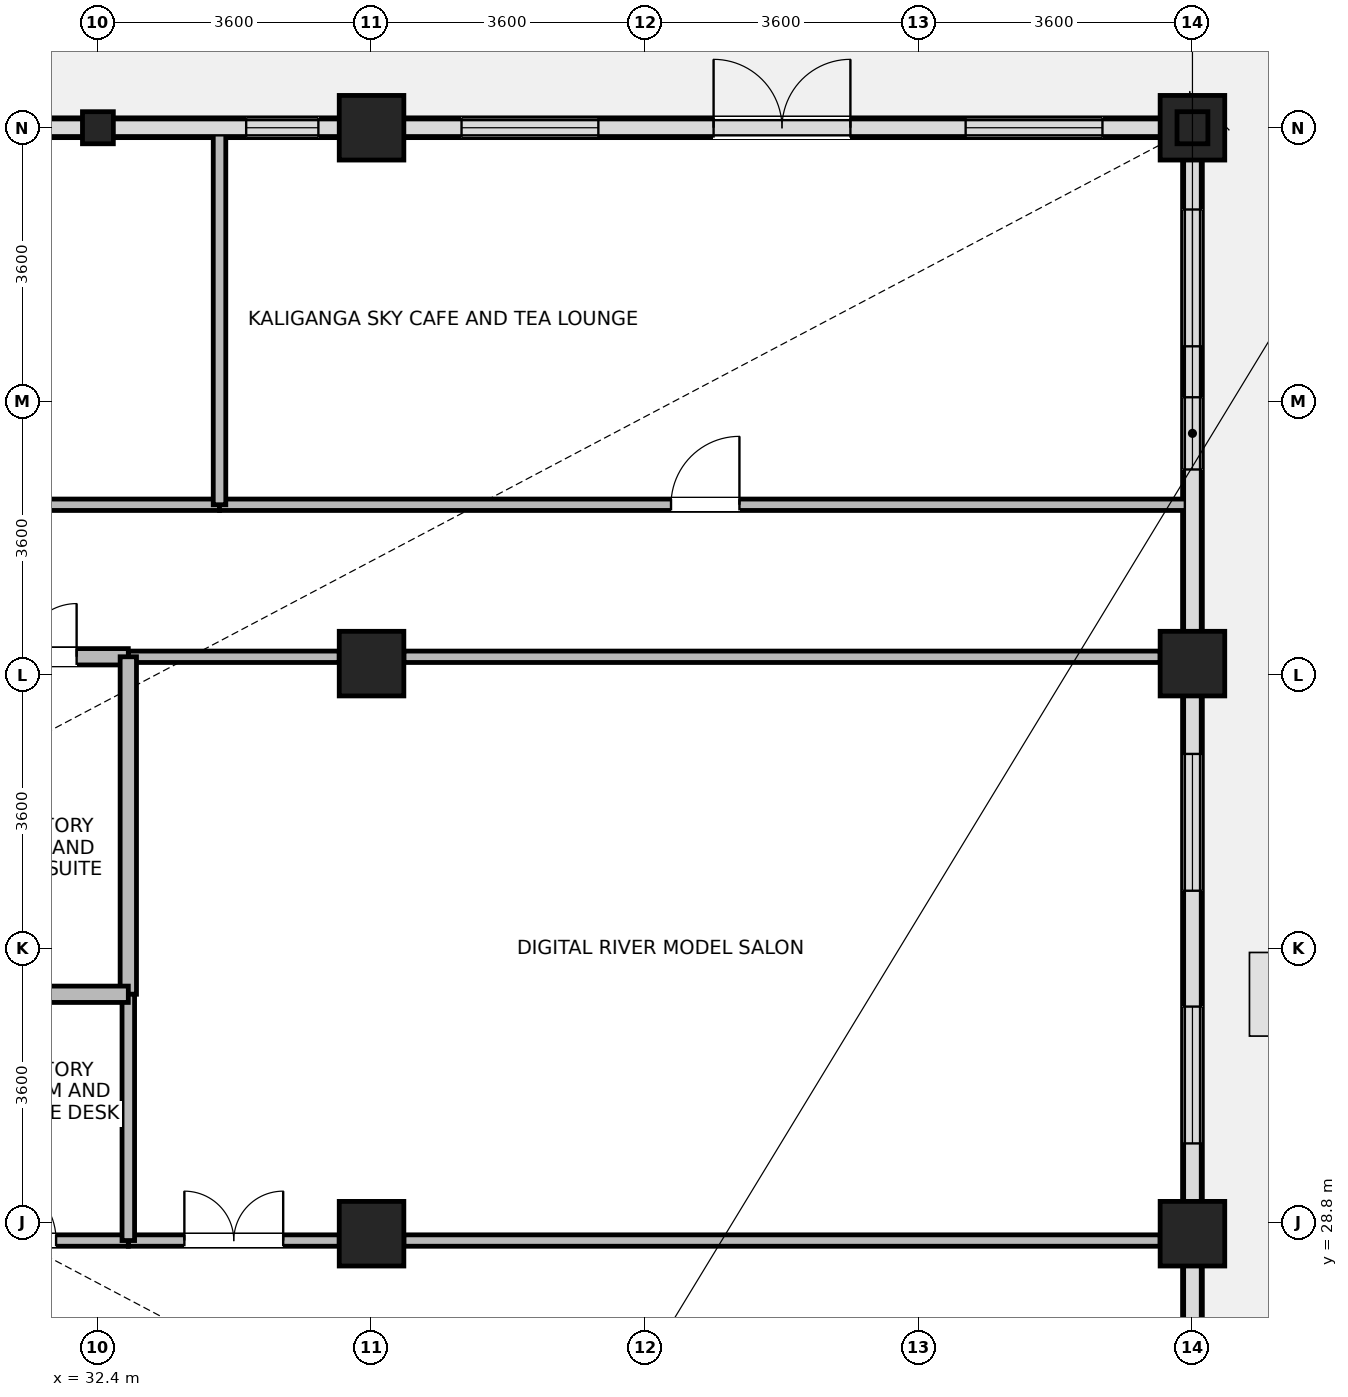
"""IFC4 building model, lengths in metres.
Left out: names, types, materials, properties, quantities, classifications, styles, units other than length and angle.
Written with IfcOpenShell. Run it as: python <this file> out.ifc"""

import sys

from ifc_helpers import new_model, si_unit, direction, frame, frame_2d, origin, origin_2d, place, context, subcontext, project, spatial, rectangle, i_section, extrude, source, transform, mapped, element, fill, save


model = new_model("IFC4")
c1 = context("Model", 3, precision=1e-05, world=origin(), true_north=direction((0.0, 1.0)))
c2 = subcontext(c1, "Body", "Model", "MODEL_VIEW")
j1 = project(units=[si_unit("LENGTHUNIT", "METRE"), si_unit("PLANEANGLEUNIT", "RADIAN")], contexts=[c1])
p1 = place(None, origin())
s1 = spatial("IfcSite", under=j1, at=p1, CompositionType="ELEMENT")
p2 = place(p1, origin())
s2 = spatial("IfcBuilding", under=s1, at=p2, CompositionType="ELEMENT")
p3 = place(p2, frame((0.0, 0.0, 298.0)))
s3 = spatial("IfcBuildingStorey", under=s2, at=p3, CompositionType="ELEMENT", Elevation=298.0)
m1 = source(origin(), c2, "Body", "SweptSolid", [
    extrude(rectangle(XDim=0.85, YDim=0.85, at=origin_2d()), origin(), (0.0, 0.0, 1.0), 6.0),
])
for number, where, z_axis, x_axis in (
    (1, (36.0, 43.2, 0.0), (0.0, 0.0, 1.0), (1.0, 0.0, 0.0)),
    (2, (36.0, 28.65, 0.0), (0.0, 0.0, 1.0), (1.0, 0.0, 0.0)),
    (3, (36.0, 36.15, 0.0), (0.0, 0.0, 1.0), (1.0, 0.0, 0.0)),
    (4, (46.8, 28.65, 0.0), (0.0, 0.0, 1.0), (1.0, 0.0, 0.0)),
    (5, (46.8, 36.15, 0.0), (0.0, 0.0, 1.0), (1.0, 0.0, 0.0)),
    (6, (46.8, 43.2, 0.0), (0.0, 0.0, 1.0), (1.0, 0.0, 0.0)),
):
    element("IfcColumn", number, at=place(p3, frame(where, z_axis=z_axis, x_axis=x_axis)), inside=s3, PredefinedType="COLUMN", context=c2, shape_type="MappedRepresentation", body=[
        mapped(m1, transform((0.0, 0.0, 0.0), x_axis=(1.0, 0.0, 0.0), y_axis=(0.0, 1.0, 0.0), z_axis=(0.0, 0.0, 1.0), scale=1.0)),
    ])
m2 = source(origin(), c2, "Body", "SweptSolid", [
    extrude(i_section(OverallWidth=0.406, OverallDepth=0.422, WebThickness=0.023, FlangeThickness=0.031, FilletRadius=0.015, at=origin_2d()), origin(), (0.0, 0.0, 1.0), 6.0),
])
p4 = place(p3, frame((32.4, 43.2, 0.0), z_axis=(0.0, 0.0, 1.0), x_axis=(1.0, 0.0, 0.0)))
e7 = element("IfcColumn", 7, at=p4, inside=s3, PredefinedType="COLUMN", context=c2, shape_type="MappedRepresentation", body=[
    mapped(m2, transform((0.0, 0.0, 0.0), x_axis=(1.0, 0.0, 0.0), y_axis=(0.0, 1.0, 0.0), z_axis=(0.0, 0.0, 1.0), scale=1.0)),
])
m3 = source(origin(), c2, "Body", "SweptSolid", [
    extrude(i_section(OverallWidth=0.406, OverallDepth=0.422, WebThickness=0.023, FlangeThickness=0.031, FilletRadius=0.015, at=origin_2d()), origin(), (0.0, 0.0, 1.0), 15.0),
])
p5 = place(p3, frame((46.8, 43.2, 6.0), z_axis=(0.0, 0.0, 1.0), x_axis=(1.0, 0.0, 0.0)))
e8 = element("IfcColumn", 8, at=p5, inside=s3, PredefinedType="COLUMN", context=c2, shape_type="MappedRepresentation", body=[
    mapped(m3, transform((0.0, 0.0, 0.0), x_axis=(1.0, 0.0, 0.0), y_axis=(0.0, 1.0, 0.0), z_axis=(0.0, 0.0, 1.0), scale=1.0)),
])
p6 = place(p3, frame((46.8, 28.224, 0.0), z_axis=(0.0, 0.0, 1.0), x_axis=(0.0, -1.0, 0.0)))
e9 = element("IfcWall", 9, at=p6, inside=s3, PredefinedType="STANDARD", context=c2, shape_type="SweptSolid", body=[
    extrude(rectangle(XDim=6.198, YDim=0.26, at=frame_2d((3.099, 0.0))), origin(), (0.0, 0.0, 1.0), 5.58),
])
p7 = place(p6, frame((2.199, 0.0, 0.0)))
e10 = element("IfcOpeningElement", 10, at=p7, cuts=e9, PredefinedType="OPENING", context=c2, shape_type="SweptSolid", body=[
    extrude(rectangle(XDim=1.8, YDim=2.2, at=frame_2d((0.9, 1.1))), frame((0.0, 0.14, 0.0), z_axis=(0.0, -1.0, 0.0), x_axis=(1.0, 0.0, 0.0)), (0.0, 0.0, 1.0), 0.28),
])
p8 = place(p3, frame((46.8, 35.724, 0.0), z_axis=(0.0, 0.0, 1.0), x_axis=(0.0, -1.0, 0.0)))
e11 = element("IfcWall", 11, at=p8, inside=s3, PredefinedType="STANDARD", context=c2, shape_type="SweptSolid", body=[
    extrude(rectangle(XDim=6.648, YDim=0.26, at=frame_2d((3.324, 0.0))), origin(), (0.0, 0.0, 1.0), 5.58),
])
p9 = place(p8, frame((0.762, 0.0, 0.85)))
e12 = element("IfcOpeningElement", 12, at=p9, cuts=e11, PredefinedType="OPENING", context=c2, shape_type="SweptSolid", body=[
    extrude(rectangle(XDim=1.8, YDim=1.85, at=frame_2d((0.9, 0.925))), frame((0.0, 0.14, 0.0), z_axis=(0.0, -1.0, 0.0), x_axis=(1.0, 0.0, 0.0)), (0.0, 0.0, 1.0), 0.28),
])
p10 = place(p8, frame((4.086, 0.0, 0.85)))
e13 = element("IfcOpeningElement", 13, at=p10, cuts=e11, PredefinedType="OPENING", context=c2, shape_type="SweptSolid", body=[
    extrude(rectangle(XDim=1.8, YDim=1.85, at=frame_2d((0.9, 0.925))), frame((0.0, 0.14, 0.0), z_axis=(0.0, -1.0, 0.0), x_axis=(1.0, 0.0, 0.0)), (0.0, 0.0, 1.0), 0.28),
])
p11 = place(p3, frame((46.8, 42.774, 0.0), z_axis=(0.0, 0.0, 1.0), x_axis=(0.0, -1.0, 0.0)))
e14 = element("IfcWall", 14, at=p11, inside=s3, PredefinedType="STANDARD", context=c2, shape_type="SweptSolid", body=[
    extrude(rectangle(XDim=6.198, YDim=0.26, at=frame_2d((3.099, 0.0))), origin(), (0.0, 0.0, 1.0), 5.58),
])
p12 = place(p11, frame((0.649, 0.0, 0.85)))
e15 = element("IfcOpeningElement", 15, at=p12, cuts=e14, PredefinedType="OPENING", context=c2, shape_type="SweptSolid", body=[
    extrude(rectangle(XDim=1.8, YDim=1.85, at=frame_2d((0.9, 0.925))), frame((0.0, 0.14, 0.0), z_axis=(0.0, -1.0, 0.0), x_axis=(1.0, 0.0, 0.0)), (0.0, 0.0, 1.0), 0.28),
])
p13 = place(p11, frame((3.12, 0.0, 0.85)))
e16 = element("IfcOpeningElement", 16, at=p13, cuts=e14, PredefinedType="OPENING", context=c2, shape_type="SweptSolid", body=[
    extrude(rectangle(XDim=0.95, YDim=1.75, at=frame_2d((0.475, 0.875))), frame((0.0, 0.14, 0.0), z_axis=(0.0, -1.0, 0.0), x_axis=(1.0, 0.0, 0.0)), (0.0, 0.0, 1.0), 0.28),
])
p14 = place(p3, frame((36.426, 43.2, 0.0), z_axis=(0.0, 0.0, 1.0), x_axis=(1.0, 0.0, 0.0)))
e17 = element("IfcWall", 17, at=p14, inside=s3, PredefinedType="STANDARD", context=c2, shape_type="SweptSolid", body=[
    extrude(rectangle(XDim=9.948, YDim=0.26, at=frame_2d((4.974, 0.0))), origin(), (0.0, 0.0, 1.0), 5.58),
])
p15 = place(p14, frame((4.074, 0.0, 0.0)))
e18 = element("IfcOpeningElement", 18, at=p15, cuts=e17, PredefinedType="OPENING", context=c2, shape_type="SweptSolid", body=[
    extrude(rectangle(XDim=1.8, YDim=2.2, at=frame_2d((0.9, 1.1))), frame((0.0, 0.14, 0.0), z_axis=(0.0, -1.0, 0.0), x_axis=(1.0, 0.0, 0.0)), (0.0, 0.0, 1.0), 0.28),
])
p16 = place(p14, frame((0.758, 0.0, 0.85)))
e19 = element("IfcOpeningElement", 19, at=p16, cuts=e17, PredefinedType="OPENING", context=c2, shape_type="SweptSolid", body=[
    extrude(rectangle(XDim=1.8, YDim=1.85, at=frame_2d((0.9, 0.925))), frame((0.0, 0.14, 0.0), z_axis=(0.0, -1.0, 0.0), x_axis=(1.0, 0.0, 0.0)), (0.0, 0.0, 1.0), 0.28),
])
p17 = place(p14, frame((7.39, 0.0, 0.85)))
e20 = element("IfcOpeningElement", 20, at=p17, cuts=e17, PredefinedType="OPENING", context=c2, shape_type="SweptSolid", body=[
    extrude(rectangle(XDim=1.8, YDim=1.85, at=frame_2d((0.9, 0.925))), frame((0.0, 0.14, 0.0), z_axis=(0.0, -1.0, 0.0), x_axis=(1.0, 0.0, 0.0)), (0.0, 0.0, 1.0), 0.28),
])
p18 = place(p3, frame((32.604, 43.2, 0.0), z_axis=(0.0, 0.0, 1.0), x_axis=(1.0, 0.0, 0.0)))
e21 = element("IfcWall", 21, at=p18, inside=s3, PredefinedType="STANDARD", context=c2, shape_type="SweptSolid", body=[
    extrude(rectangle(XDim=2.97, YDim=0.26, at=frame_2d((1.485, 0.0))), origin(), (0.0, 0.0, 1.0), 5.58),
])
p19 = place(p18, frame((1.747, 0.0, 0.85)))
e22 = element("IfcOpeningElement", 22, at=p19, cuts=e21, PredefinedType="OPENING", context=c2, shape_type="SweptSolid", body=[
    extrude(rectangle(XDim=0.95, YDim=1.75, at=frame_2d((0.475, 0.875))), frame((0.0, 0.14, 0.0), z_axis=(0.0, -1.0, 0.0), x_axis=(1.0, 0.0, 0.0)), (0.0, 0.0, 1.0), 0.28),
])
p20 = place(p3, frame((29.226, 43.2, 0.0), z_axis=(0.0, 0.0, 1.0), x_axis=(1.0, 0.0, 0.0)))
e23 = element("IfcWall", 23, at=p20, inside=s3, PredefinedType="STANDARD", context=c2, shape_type="SweptSolid", body=[
    extrude(rectangle(XDim=2.97, YDim=0.26, at=frame_2d((1.485, 0.0))), origin(), (0.0, 0.0, 1.0), 5.58),
])
p21 = place(p20, frame((1.01, 0.0, 0.85)))
e24 = element("IfcOpeningElement", 24, at=p21, cuts=e23, PredefinedType="OPENING", context=c2, shape_type="SweptSolid", body=[
    extrude(rectangle(XDim=0.95, YDim=1.75, at=frame_2d((0.475, 0.875))), frame((0.0, 0.14, 0.0), z_axis=(0.0, -1.0, 0.0), x_axis=(1.0, 0.0, 0.0)), (0.0, 0.0, 1.0), 0.28),
])
p22 = place(p3, frame((8.5, 38.24, 0.0), z_axis=(0.0, 0.0, 1.0), x_axis=(1.0, 0.0, 0.0)))
e25 = element("IfcWall", 25, at=p22, inside=s3, PredefinedType="PARTITIONING", context=c2, shape_type="SweptSolid", body=[
    extrude(rectangle(XDim=25.5, YDim=0.15, at=frame_2d((12.75, 0.0))), origin(), (0.0, 0.0, 1.0), 5.9),
])
p23 = place(p22, frame((12.1, 0.0, 0.0)))
e26 = element("IfcOpeningElement", 26, at=p23, cuts=e25, PredefinedType="OPENING", context=c2, shape_type="SweptSolid", body=[
    extrude(rectangle(XDim=1.3, YDim=2.12, at=frame_2d((0.65, 1.06))), frame((0.0, 0.085, 0.0), z_axis=(0.0, -1.0, 0.0), x_axis=(1.0, 0.0, 0.0)), (0.0, 0.0, 1.0), 0.17),
])
p24 = place(p3, frame((32.8, 28.56, 0.0), z_axis=(0.0, 0.0, 1.0), x_axis=(1.0, 0.0, 0.0)))
e27 = element("IfcWall", 27, at=p24, inside=s3, PredefinedType="PARTITIONING", context=c2, shape_type="SweptSolid", body=[
    extrude(rectangle(XDim=2.775, YDim=0.15, at=frame_2d((1.387, 0.0))), origin(), (0.0, 0.0, 1.0), 5.43),
])
p25 = place(p24, frame((0.738, 0.0, 0.0)))
e28 = element("IfcOpeningElement", 28, at=p25, cuts=e27, PredefinedType="OPENING", context=c2, shape_type="SweptSolid", body=[
    extrude(rectangle(XDim=1.3, YDim=2.12, at=frame_2d((0.65, 1.06))), frame((0.0, 0.085, 0.0), z_axis=(0.0, -1.0, 0.0), x_axis=(1.0, 0.0, 0.0)), (0.0, 0.0, 1.0), 0.17),
])
p26 = place(p3, frame((36.425, 28.56, 0.0), z_axis=(0.0, 0.0, 1.0), x_axis=(1.0, 0.0, 0.0)))
e29 = element("IfcWall", 29, at=p26, inside=s3, PredefinedType="PARTITIONING", context=c2, shape_type="SweptSolid", body=[
    extrude(rectangle(XDim=9.95, YDim=0.15, at=frame_2d((4.975, 0.0))), origin(), (0.0, 0.0, 1.0), 5.43),
])
p27 = place(p3, frame((32.8, 36.24, 0.0), z_axis=(0.0, 0.0, 1.0), x_axis=(1.0, 0.0, 0.0)))
e30 = element("IfcWall", 30, at=p27, inside=s3, PredefinedType="PARTITIONING", context=c2, shape_type="SweptSolid", body=[
    extrude(rectangle(XDim=2.775, YDim=0.15, at=frame_2d((1.387, 0.0))), origin(), (0.0, 0.0, 1.0), 5.43),
])
p28 = place(p3, frame((36.425, 36.24, 0.0), z_axis=(0.0, 0.0, 1.0), x_axis=(1.0, 0.0, 0.0)))
e31 = element("IfcWall", 31, at=p28, inside=s3, PredefinedType="PARTITIONING", context=c2, shape_type="SweptSolid", body=[
    extrude(rectangle(XDim=9.95, YDim=0.15, at=frame_2d((4.975, 0.0))), origin(), (0.0, 0.0, 1.0), 5.43),
])
p29 = place(p3, frame((34.0, 38.24, 0.0), z_axis=(0.0, 0.0, 1.0), x_axis=(1.0, 0.0, 0.0)))
e32 = element("IfcWall", 32, at=p29, inside=s3, PredefinedType="PARTITIONING", context=c2, shape_type="SweptSolid", body=[
    extrude(rectangle(XDim=12.78, YDim=0.15, at=frame_2d((6.39, 0.0))), origin(), (0.0, 0.0, 1.0), 5.9),
])
p30 = place(p29, frame((5.94, 0.0, 0.0)))
e33 = element("IfcOpeningElement", 33, at=p30, cuts=e32, PredefinedType="OPENING", context=c2, shape_type="SweptSolid", body=[
    extrude(rectangle(XDim=0.9, YDim=2.08, at=frame_2d((0.45, 1.04))), frame((0.0, 0.085, 0.0), z_axis=(0.0, -1.0, 0.0), x_axis=(1.0, 0.0, 0.0)), (0.0, 0.0, 1.0), 0.17),
])
p31 = place(p3, frame((30.04, 28.56, 0.0), z_axis=(0.0, 0.0, 1.0), x_axis=(1.0, 0.0, 0.0)))
e34 = element("IfcWall", 34, at=p31, inside=s3, PredefinedType="PARTITIONING", context=c2, shape_type="SweptSolid", body=[
    extrude(rectangle(XDim=2.76, YDim=0.15, at=frame_2d((1.38, 0.0))), origin(), (0.0, 0.0, 1.0), 5.43),
])
p32 = place(p31, frame((0.95, 0.0, 0.0)))
e35 = element("IfcOpeningElement", 35, at=p32, cuts=e34, PredefinedType="OPENING", context=c2, shape_type="SweptSolid", body=[
    extrude(rectangle(XDim=0.86, YDim=2.02, at=frame_2d((0.43, 1.01))), frame((0.0, 0.085, 0.0), z_axis=(0.0, -1.0, 0.0), x_axis=(1.0, 0.0, 0.0)), (0.0, 0.0, 1.0), 0.17),
])
p33 = place(p3, frame((30.04, 36.24, 0.0), z_axis=(0.0, 0.0, 1.0), x_axis=(1.0, 0.0, 0.0)))
e36 = element("IfcWall", 36, at=p33, inside=s3, PredefinedType="PARTITIONING", context=c2, shape_type="SweptSolid", body=[
    extrude(rectangle(XDim=2.76, YDim=0.215, at=frame_2d((1.38, 0.0))), origin(), (0.0, 0.0, 1.0), 5.43),
])
p34 = place(p33, frame((0.68, 0.0, 0.0)))
e37 = element("IfcOpeningElement", 37, at=p34, cuts=e36, PredefinedType="OPENING", context=c2, shape_type="SweptSolid", body=[
    extrude(rectangle(XDim=1.4, YDim=2.15, at=frame_2d((0.7, 1.075))), frame((0.0, 0.118, 0.0), z_axis=(0.0, -1.0, 0.0), x_axis=(1.0, 0.0, 0.0)), (0.0, 0.0, 1.0), 0.235),
])
p35 = place(p3, frame((34.0, 38.24, 0.0), z_axis=(0.0, 0.0, 1.0), x_axis=(0.0, 1.0, 0.0)))
e38 = element("IfcWall", 38, at=p35, inside=s3, PredefinedType="PARTITIONING", context=c2, shape_type="SweptSolid", body=[
    extrude(rectangle(XDim=4.94, YDim=0.165, at=frame_2d((2.47, 0.0))), origin(), (0.0, 0.0, 1.0), 5.9),
])
p36 = place(p3, frame((32.8, 31.8, 0.0), z_axis=(0.0, 0.0, 1.0), x_axis=(0.0, 1.0, 0.0)))
e39 = element("IfcWall", 39, at=p36, inside=s3, PredefinedType="PARTITIONING", context=c2, shape_type="SweptSolid", body=[
    extrude(rectangle(XDim=4.44, YDim=0.215, at=frame_2d((2.22, 0.0))), origin(), (0.0, 0.0, 1.0), 5.9),
])
p37 = place(p3, frame((32.8, 28.56, 0.0), z_axis=(0.0, 0.0, 1.0), x_axis=(0.0, 1.0, 0.0)))
e40 = element("IfcWall", 40, at=p37, inside=s3, PredefinedType="PARTITIONING", context=c2, shape_type="SweptSolid", body=[
    extrude(rectangle(XDim=3.24, YDim=0.165, at=frame_2d((1.62, 0.0))), origin(), (0.0, 0.0, 1.0), 5.9),
])
p38 = place(p3, frame((30.04, 31.8, 0.0), z_axis=(0.0, 0.0, 1.0), x_axis=(1.0, 0.0, 0.0)))
e41 = element("IfcWall", 41, at=p38, inside=s3, PredefinedType="PARTITIONING", context=c2, shape_type="SweptSolid", body=[
    extrude(rectangle(XDim=2.76, YDim=0.215, at=frame_2d((1.38, 0.0))), origin(), (0.0, 0.0, 1.0), 5.9),
])
p39 = place(p9, origin())
e42 = element("IfcWindow", 42, at=p39, inside=s3, PartitioningType="SINGLE_PANEL", PredefinedType="WINDOW", context=c2, shape_type="SweptSolid", body=[
    extrude(rectangle(XDim=1.8, YDim=1.85, at=frame_2d((0.9, 0.925))), frame((0.0, 0.03, 0.0), z_axis=(0.0, -1.0, 0.0), x_axis=(1.0, 0.0, 0.0)), (0.0, 0.0, 1.0), 0.06),
])
fill(e12, e42)
p40 = place(p10, origin())
e43 = element("IfcWindow", 43, at=p40, inside=s3, PartitioningType="SINGLE_PANEL", PredefinedType="WINDOW", context=c2, shape_type="SweptSolid", body=[
    extrude(rectangle(XDim=1.8, YDim=1.85, at=frame_2d((0.9, 0.925))), frame((0.0, 0.03, 0.0), z_axis=(0.0, -1.0, 0.0), x_axis=(1.0, 0.0, 0.0)), (0.0, 0.0, 1.0), 0.06),
])
fill(e13, e43)
p41 = place(p12, origin())
e44 = element("IfcWindow", 44, at=p41, inside=s3, PartitioningType="SINGLE_PANEL", PredefinedType="WINDOW", context=c2, shape_type="SweptSolid", body=[
    extrude(rectangle(XDim=1.8, YDim=1.85, at=frame_2d((0.9, 0.925))), frame((0.0, 0.03, 0.0), z_axis=(0.0, -1.0, 0.0), x_axis=(1.0, 0.0, 0.0)), (0.0, 0.0, 1.0), 0.06),
])
fill(e15, e44)
p42 = place(p13, origin())
e45 = element("IfcWindow", 45, at=p42, inside=s3, PartitioningType="SINGLE_PANEL", PredefinedType="WINDOW", context=c2, shape_type="SweptSolid", body=[
    extrude(rectangle(XDim=0.95, YDim=1.75, at=frame_2d((0.475, 0.875))), frame((0.0, 0.03, 0.0), z_axis=(0.0, -1.0, 0.0), x_axis=(1.0, 0.0, 0.0)), (0.0, 0.0, 1.0), 0.06),
])
fill(e16, e45)
p43 = place(p15, origin())
e46 = element("IfcDoor", 46, at=p43, inside=s3, OperationType="DOUBLE_DOOR_SINGLE_SWING", PredefinedType="DOOR", context=c2, shape_type="SweptSolid", body=[
    extrude(rectangle(XDim=1.8, YDim=2.2, at=frame_2d((0.9, 1.1))), frame((0.0, 0.025, 0.0), z_axis=(0.0, -1.0, 0.0), x_axis=(1.0, 0.0, 0.0)), (0.0, 0.0, 1.0), 0.05),
])
fill(e18, e46)
p44 = place(p16, origin())
e47 = element("IfcWindow", 47, at=p44, inside=s3, PartitioningType="SINGLE_PANEL", PredefinedType="WINDOW", context=c2, shape_type="SweptSolid", body=[
    extrude(rectangle(XDim=1.8, YDim=1.85, at=frame_2d((0.9, 0.925))), frame((0.0, 0.03, 0.0), z_axis=(0.0, -1.0, 0.0), x_axis=(1.0, 0.0, 0.0)), (0.0, 0.0, 1.0), 0.06),
])
fill(e19, e47)
p45 = place(p17, origin())
e48 = element("IfcWindow", 48, at=p45, inside=s3, PartitioningType="SINGLE_PANEL", PredefinedType="WINDOW", context=c2, shape_type="SweptSolid", body=[
    extrude(rectangle(XDim=1.8, YDim=1.85, at=frame_2d((0.9, 0.925))), frame((0.0, 0.03, 0.0), z_axis=(0.0, -1.0, 0.0), x_axis=(1.0, 0.0, 0.0)), (0.0, 0.0, 1.0), 0.06),
])
fill(e20, e48)
p46 = place(p19, origin())
e49 = element("IfcWindow", 49, at=p46, inside=s3, PartitioningType="SINGLE_PANEL", PredefinedType="WINDOW", context=c2, shape_type="SweptSolid", body=[
    extrude(rectangle(XDim=0.95, YDim=1.75, at=frame_2d((0.475, 0.875))), frame((0.0, 0.03, 0.0), z_axis=(0.0, -1.0, 0.0), x_axis=(1.0, 0.0, 0.0)), (0.0, 0.0, 1.0), 0.06),
])
fill(e22, e49)
p47 = place(p25, origin())
e50 = element("IfcDoor", 50, at=p47, inside=s3, OperationType="DOUBLE_DOOR_SINGLE_SWING", PredefinedType="DOOR", context=c2, shape_type="SweptSolid", body=[
    extrude(rectangle(XDim=1.3, YDim=2.12, at=frame_2d((0.65, 1.06))), frame((0.0, 0.025, 0.0), z_axis=(0.0, -1.0, 0.0), x_axis=(1.0, 0.0, 0.0)), (0.0, 0.0, 1.0), 0.05),
])
fill(e28, e50)
p48 = place(p30, origin())
e51 = element("IfcDoor", 51, at=p48, inside=s3, OperationType="SINGLE_SWING_RIGHT", PredefinedType="DOOR", context=c2, shape_type="SweptSolid", body=[
    extrude(rectangle(XDim=0.9, YDim=2.08, at=frame_2d((0.45, 1.04))), frame((0.0, 0.025, 0.0), z_axis=(0.0, -1.0, 0.0), x_axis=(1.0, 0.0, 0.0)), (0.0, 0.0, 1.0), 0.05),
])
fill(e33, e51)
p49 = place(p32, origin())
e52 = element("IfcDoor", 52, at=p49, inside=s3, OperationType="SINGLE_SWING_LEFT", PredefinedType="DOOR", context=c2, shape_type="SweptSolid", body=[
    extrude(rectangle(XDim=0.86, YDim=2.02, at=frame_2d((0.43, 1.01))), frame((0.0, 0.025, 0.0), z_axis=(0.0, -1.0, 0.0), x_axis=(1.0, 0.0, 0.0)), (0.0, 0.0, 1.0), 0.05),
])
fill(e35, e52)
p50 = place(p34, origin())
e53 = element("IfcDoor", 53, at=p50, inside=s3, OperationType="DOUBLE_DOOR_SINGLE_SWING", PredefinedType="DOOR", context=c2, shape_type="SweptSolid", body=[
    extrude(rectangle(XDim=1.4, YDim=2.15, at=frame_2d((0.7, 1.075))), frame((0.0, 0.025, 0.0), z_axis=(0.0, -1.0, 0.0), x_axis=(1.0, 0.0, 0.0)), (0.0, 0.0, 1.0), 0.05),
])
fill(e37, e53)
save(model, sys.argv[1])
